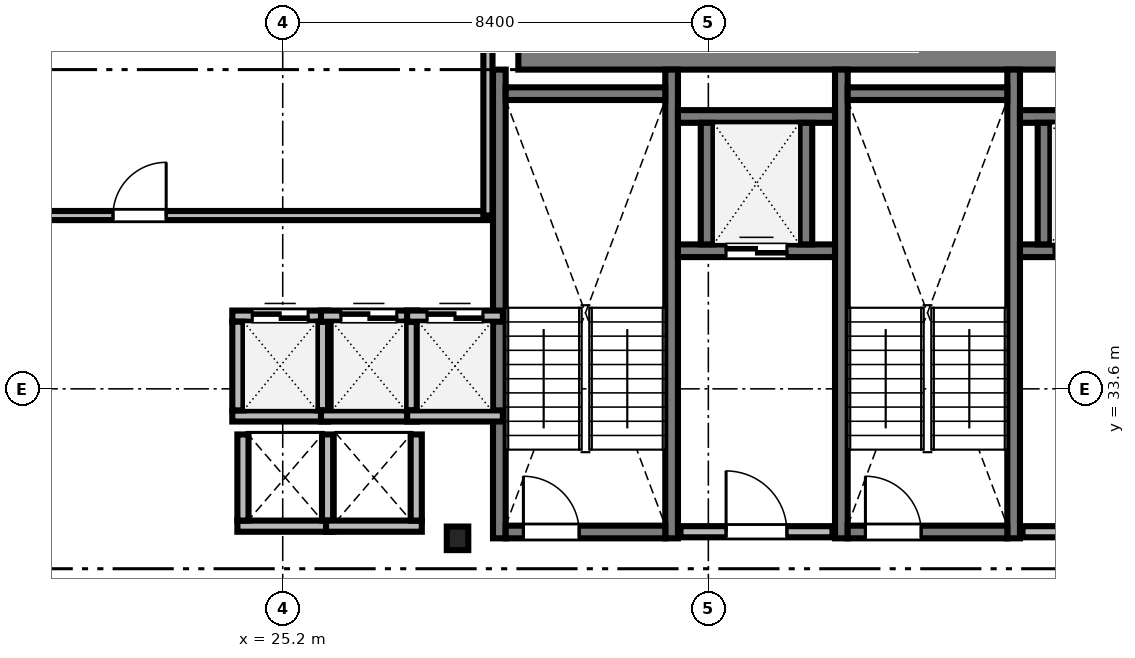
"""IFC4 building model, lengths in metres.
Left out: names, types, materials, properties, quantities, classifications, styles, units other than length and angle.
Written with IfcOpenShell. Run it as: python <this file> out.ifc"""

import sys

from ifc_helpers import new_model, si_unit, direction, frame, frame_2d, origin, origin_2d, place, context, subcontext, project, spatial, rectangle, i_section, extrude, source, transform, mapped, element, fill, save


model = new_model("IFC4")
c1 = context("Model", 3, precision=1e-05, world=origin(), true_north=direction((0.0, 1.0)))
c2 = subcontext(c1, "Body", "Model", "MODEL_VIEW")
j1 = project(units=[si_unit("LENGTHUNIT", "METRE"), si_unit("PLANEANGLEUNIT", "RADIAN")], contexts=[c1])
p1 = place(None, origin())
s1 = spatial("IfcSite", under=j1, at=p1, CompositionType="ELEMENT")
p2 = place(p1, origin())
s2 = spatial("IfcBuilding", under=s1, at=p2, CompositionType="ELEMENT")
p3 = place(p2, frame((0.0, 0.0, 118.7)))
s3 = spatial("IfcBuildingStorey", under=s2, at=p3, CompositionType="ELEMENT", Elevation=118.7)
m1 = source(origin(), c2, "Body", "SweptSolid", [
    extrude(rectangle(XDim=17.52, YDim=0.8, at=frame_2d((8.76, 0.0))), origin(), (0.0, 0.0, 1.0), 3.46),
])
p4 = place(p3, frame((29.85, 40.3, 0.0), z_axis=(0.0, 0.0, 1.0), x_axis=(1.0, 0.0, 0.0)))
e1 = element("IfcWall", 1, at=p4, inside=s3, PredefinedType="SHEAR", context=c2, shape_type="MappedRepresentation", body=[
    mapped(m1, transform((0.0, 0.0, 0.0), scale=1.0)),
])
m2 = source(origin(), c2, "Body", "SweptSolid", [
    extrude(i_section(OverallWidth=0.424, OverallDepth=0.465, WebThickness=0.035, FlangeThickness=0.056, FilletRadius=0.015, at=origin_2d()), origin(), (0.0, 0.0, 1.0), 3.46),
])
p5 = place(p3, frame((28.65, 30.65, 0.0), z_axis=(0.0, 0.0, 1.0), x_axis=(1.0, 0.0, 0.0)))
e2 = element("IfcColumn", 2, at=p5, inside=s3, PredefinedType="COLUMN", context=c2, shape_type="MappedRepresentation", body=[
    mapped(m2, transform((0.0, 0.0, 0.0), scale=1.0)),
])
m3 = source(origin(), c2, "Body", "SweptSolid", [
    extrude(rectangle(XDim=9.25, YDim=0.25, at=frame_2d((4.625, 0.0))), origin(), (0.0, 0.0, 1.0), 3.5),
])
for number, where, z_axis, x_axis in (
    (3, (29.475, 30.65, 0.0), (0.0, 0.0, 1.0), (0.0, 1.0, 0.0)),
    (4, (32.875, 30.65, 0.0), (0.0, 0.0, 1.0), (0.0, 1.0, 0.0)),
):
    element("IfcWall", number, at=place(p3, frame(where, z_axis=z_axis, x_axis=x_axis)), inside=s3, PredefinedType="SOLIDWALL", context=c2, shape_type="MappedRepresentation", body=[
        mapped(m3, transform((0.0, 0.0, 0.0), scale=1.0)),
    ])
m4 = source(origin(), c2, "Body", "SweptSolid", [
    extrude(rectangle(XDim=3.15, YDim=0.25, at=frame_2d((1.575, 0.0))), origin(), (0.0, 0.0, 1.0), 3.5),
])
p6 = place(p3, frame((29.6, 39.425, 0.0), z_axis=(0.0, 0.0, 1.0), x_axis=(1.0, 0.0, 0.0)))
e5 = element("IfcWall", 5, at=p6, inside=s3, PredefinedType="SOLIDWALL", context=c2, shape_type="MappedRepresentation", body=[
    mapped(m4, transform((0.0, 0.0, 0.0), scale=1.0)),
])
p7 = place(p3, frame((29.6, 30.775, 0.0), z_axis=(0.0, 0.0, 1.0), x_axis=(1.0, 0.0, 0.0)))
e6 = element("IfcWall", 6, at=p7, inside=s3, PredefinedType="SOLIDWALL", context=c2, shape_type="MappedRepresentation", body=[
    mapped(m4, transform((0.0, 0.0, 0.0), scale=1.0)),
])
m5 = source(origin(), c2, "Body", "SweptSolid", [
    extrude(rectangle(XDim=1.1, YDim=2.2, at=frame_2d((0.55, 1.1))), frame((0.0, 0.135, 0.0), z_axis=(0.0, -1.0, 0.0), x_axis=(1.0, 0.0, 0.0)), (0.0, 0.0, 1.0), 0.27),
])
p8 = place(p7, frame((0.35, 0.0, 0.0)))
e7 = element("IfcOpeningElement", 7, at=p8, cuts=e6, PredefinedType="OPENING", context=c2, shape_type="MappedRepresentation", body=[
    mapped(m5, transform((0.0, 0.0, 0.0), scale=1.0)),
])
for number, where, z_axis, x_axis in (
    (8, (36.225, 30.65, 0.0), (0.0, 0.0, 1.0), (0.0, 1.0, 0.0)),
    (9, (39.625, 30.65, 0.0), (0.0, 0.0, 1.0), (0.0, 1.0, 0.0)),
):
    element("IfcWall", number, at=place(p3, frame(where, z_axis=z_axis, x_axis=x_axis)), inside=s3, PredefinedType="SOLIDWALL", context=c2, shape_type="MappedRepresentation", body=[
        mapped(m3, transform((0.0, 0.0, 0.0), scale=1.0)),
    ])
p9 = place(p3, frame((36.35, 39.425, 0.0), z_axis=(0.0, 0.0, 1.0), x_axis=(1.0, 0.0, 0.0)))
e10 = element("IfcWall", 10, at=p9, inside=s3, PredefinedType="SOLIDWALL", context=c2, shape_type="MappedRepresentation", body=[
    mapped(m4, transform((0.0, 0.0, 0.0), scale=1.0)),
])
p10 = place(p3, frame((36.35, 30.775, 0.0), z_axis=(0.0, 0.0, 1.0), x_axis=(1.0, 0.0, 0.0)))
e11 = element("IfcWall", 11, at=p10, inside=s3, PredefinedType="SOLIDWALL", context=c2, shape_type="MappedRepresentation", body=[
    mapped(m4, transform((0.0, 0.0, 0.0), scale=1.0)),
])
p11 = place(p10, frame((0.35, 0.0, 0.0)))
e12 = element("IfcOpeningElement", 12, at=p11, cuts=e11, PredefinedType="OPENING", context=c2, shape_type="MappedRepresentation", body=[
    mapped(m5, transform((0.0, 0.0, 0.0), scale=1.0)),
])
m6 = source(origin(), c2, "Body", "SweptSolid", [
    extrude(rectangle(XDim=3.0, YDim=0.22, at=frame_2d((1.5, 0.0))), origin(), (0.0, 0.0, 1.0), 3.46),
])
p12 = place(p3, frame((33.05, 30.78, 0.0), z_axis=(0.0, 0.0, 1.0), x_axis=(1.0, 0.0, 0.0)))
e13 = element("IfcWall", 13, at=p12, inside=s3, PredefinedType="SOLIDWALL", context=c2, shape_type="MappedRepresentation", body=[
    mapped(m6, transform((0.0, 0.0, 0.0), scale=1.0)),
])
m7 = source(origin(), c2, "Body", "SweptSolid", [
    extrude(rectangle(XDim=1.2, YDim=2.2, at=frame_2d((0.6, 1.1))), frame((0.0, 0.12, 0.0), z_axis=(0.0, -1.0, 0.0), x_axis=(1.0, 0.0, 0.0)), (0.0, 0.0, 1.0), 0.24),
])
p13 = place(p12, frame((0.9, 0.0, 0.0)))
e14 = element("IfcOpeningElement", 14, at=p13, cuts=e13, PredefinedType="OPENING", context=c2, shape_type="MappedRepresentation", body=[
    mapped(m7, transform((0.0, 0.0, 0.0), scale=1.0)),
])
m8 = source(origin(), c2, "Body", "SweptSolid", [
    extrude(rectangle(XDim=2.8, YDim=0.22, at=frame_2d((1.4, 0.0))), origin(), (0.0, 0.0, 1.0), 3.46),
])
p14 = place(p3, frame((39.8, 30.78, 0.0), z_axis=(0.0, 0.0, 1.0), x_axis=(1.0, 0.0, 0.0)))
e15 = element("IfcWall", 15, at=p14, inside=s3, PredefinedType="SOLIDWALL", context=c2, shape_type="MappedRepresentation", body=[
    mapped(m8, transform((0.0, 0.0, 0.0), scale=1.0)),
])
p15 = place(p14, frame((0.8, 0.0, 0.0)))
e16 = element("IfcOpeningElement", 16, at=p15, cuts=e15, PredefinedType="OPENING", context=c2, shape_type="MappedRepresentation", body=[
    mapped(m7, transform((0.0, 0.0, 0.0), scale=1.0)),
])
m9 = source(origin(), c2, "Body", "SweptSolid", [
    extrude(rectangle(XDim=1.89, YDim=0.22, at=frame_2d((0.945, 0.0))), origin(), (0.0, 0.0, 1.0), 3.46),
])
p16 = place(p3, frame((24.205, 33.065, 0.0), z_axis=(0.0, 0.0, 1.0), x_axis=(1.0, 0.0, 0.0)))
e17 = element("IfcWall", 17, at=p16, inside=s3, PredefinedType="SOLIDWALL", context=c2, shape_type="MappedRepresentation", body=[
    mapped(m9, transform((0.0, 0.0, 0.0), scale=1.0)),
])
p17 = place(p3, frame((24.205, 35.035, 0.0), z_axis=(0.0, 0.0, 1.0), x_axis=(1.0, 0.0, 0.0)))
e18 = element("IfcWall", 18, at=p17, inside=s3, PredefinedType="SOLIDWALL", context=c2, shape_type="MappedRepresentation", body=[
    mapped(m9, transform((0.0, 0.0, 0.0), scale=1.0)),
])
m10 = source(origin(), c2, "Body", "SweptSolid", [
    extrude(rectangle(XDim=1.1, YDim=2.2, at=frame_2d((0.55, 1.1))), frame((0.0, 0.12, 0.0), z_axis=(0.0, -1.0, 0.0), x_axis=(1.0, 0.0, 0.0)), (0.0, 0.0, 1.0), 0.24),
])
p18 = place(p17, frame((0.395, 0.0, 0.0)))
e19 = element("IfcOpeningElement", 19, at=p18, cuts=e18, PredefinedType="OPENING", context=c2, shape_type="MappedRepresentation", body=[
    mapped(m10, transform((0.0, 0.0, 0.0), scale=1.0)),
])
m11 = source(origin(), c2, "Body", "SweptSolid", [
    extrude(rectangle(XDim=1.75, YDim=0.22, at=frame_2d((0.875, 0.0))), origin(), (0.0, 0.0, 1.0), 3.46),
])
for number, where, z_axis, x_axis in (
    (20, (24.315, 33.175, 0.0), (0.0, 0.0, 1.0), (0.0, 1.0, 0.0)),
    (21, (25.985, 33.175, 0.0), (0.0, 0.0, 1.0), (0.0, 1.0, 0.0)),
):
    element("IfcWall", number, at=place(p3, frame(where, z_axis=z_axis, x_axis=x_axis)), inside=s3, PredefinedType="SOLIDWALL", context=c2, shape_type="MappedRepresentation", body=[
        mapped(m11, transform((0.0, 0.0, 0.0), scale=1.0)),
    ])
p19 = place(p3, frame((25.955, 33.065, 0.0), z_axis=(0.0, 0.0, 1.0), x_axis=(1.0, 0.0, 0.0)))
e22 = element("IfcWall", 22, at=p19, inside=s3, PredefinedType="SOLIDWALL", context=c2, shape_type="MappedRepresentation", body=[
    mapped(m9, transform((0.0, 0.0, 0.0), scale=1.0)),
])
p20 = place(p3, frame((25.955, 35.035, 0.0), z_axis=(0.0, 0.0, 1.0), x_axis=(1.0, 0.0, 0.0)))
e23 = element("IfcWall", 23, at=p20, inside=s3, PredefinedType="SOLIDWALL", context=c2, shape_type="MappedRepresentation", body=[
    mapped(m9, transform((0.0, 0.0, 0.0), scale=1.0)),
])
p21 = place(p20, frame((0.395, 0.0, 0.0)))
e24 = element("IfcOpeningElement", 24, at=p21, cuts=e23, PredefinedType="OPENING", context=c2, shape_type="MappedRepresentation", body=[
    mapped(m10, transform((0.0, 0.0, 0.0), scale=1.0)),
])
p22 = place(p3, frame((27.735, 33.175, 0.0), z_axis=(0.0, 0.0, 1.0), x_axis=(0.0, 1.0, 0.0)))
e25 = element("IfcWall", 25, at=p22, inside=s3, PredefinedType="SOLIDWALL", context=c2, shape_type="MappedRepresentation", body=[
    mapped(m11, transform((0.0, 0.0, 0.0), scale=1.0)),
])
p23 = place(p3, frame((27.655, 33.065, 0.0), z_axis=(0.0, 0.0, 1.0), x_axis=(1.0, 0.0, 0.0)))
e26 = element("IfcWall", 26, at=p23, inside=s3, PredefinedType="SOLIDWALL", context=c2, shape_type="MappedRepresentation", body=[
    mapped(m9, transform((0.0, 0.0, 0.0), scale=1.0)),
])
p24 = place(p3, frame((27.655, 35.035, 0.0), z_axis=(0.0, 0.0, 1.0), x_axis=(1.0, 0.0, 0.0)))
e27 = element("IfcWall", 27, at=p24, inside=s3, PredefinedType="SOLIDWALL", context=c2, shape_type="MappedRepresentation", body=[
    mapped(m9, transform((0.0, 0.0, 0.0), scale=1.0)),
])
p25 = place(p24, frame((0.395, 0.0, 0.0)))
e28 = element("IfcOpeningElement", 28, at=p25, cuts=e27, PredefinedType="OPENING", context=c2, shape_type="MappedRepresentation", body=[
    mapped(m10, transform((0.0, 0.0, 0.0), scale=1.0)),
])
m12 = source(origin(), c2, "Body", "SweptSolid", [
    extrude(rectangle(XDim=3.1, YDim=0.25, at=frame_2d((1.55, 0.0))), origin(), (0.0, 0.0, 1.0), 3.46),
])
p26 = place(p3, frame((33.0, 36.325, 0.0), z_axis=(0.0, 0.0, 1.0), x_axis=(1.0, 0.0, 0.0)))
e29 = element("IfcWall", 29, at=p26, inside=s3, PredefinedType="SOLIDWALL", context=c2, shape_type="MappedRepresentation", body=[
    mapped(m12, transform((0.0, 0.0, 0.0), scale=1.0)),
])
m13 = source(origin(), c2, "Body", "SweptSolid", [
    extrude(rectangle(XDim=1.2, YDim=2.25, at=frame_2d((0.6, 1.125))), frame((0.0, 0.135, 0.0), z_axis=(0.0, -1.0, 0.0), x_axis=(1.0, 0.0, 0.0)), (0.0, 0.0, 1.0), 0.27),
])
p27 = place(p26, frame((0.95, 0.0, 0.0)))
e30 = element("IfcOpeningElement", 30, at=p27, cuts=e29, PredefinedType="OPENING", context=c2, shape_type="MappedRepresentation", body=[
    mapped(m13, transform((0.0, 0.0, 0.0), scale=1.0)),
])
p28 = place(p3, frame((33.0, 38.975, 0.0), z_axis=(0.0, 0.0, 1.0), x_axis=(1.0, 0.0, 0.0)))
e31 = element("IfcWall", 31, at=p28, inside=s3, PredefinedType="SOLIDWALL", context=c2, shape_type="MappedRepresentation", body=[
    mapped(m12, transform((0.0, 0.0, 0.0), scale=1.0)),
])
m14 = source(origin(), c2, "Body", "SweptSolid", [
    extrude(rectangle(XDim=2.4, YDim=0.25, at=frame_2d((1.2, 0.0))), origin(), (0.0, 0.0, 1.0), 3.46),
])
for number, where, z_axis, x_axis in (
    (32, (33.575, 36.45, 0.0), (0.0, 0.0, 1.0), (0.0, 1.0, 0.0)),
    (33, (35.525, 36.45, 0.0), (0.0, 0.0, 1.0), (0.0, 1.0, 0.0)),
):
    element("IfcWall", number, at=place(p3, frame(where, z_axis=z_axis, x_axis=x_axis)), inside=s3, PredefinedType="SOLIDWALL", context=c2, shape_type="MappedRepresentation", body=[
        mapped(m14, transform((0.0, 0.0, 0.0), scale=1.0)),
    ])
m15 = source(origin(), c2, "Body", "SweptSolid", [
    extrude(rectangle(XDim=2.55, YDim=0.25, at=frame_2d((1.275, 0.0))), origin(), (0.0, 0.0, 1.0), 3.46),
])
p29 = place(p3, frame((39.75, 36.325, 0.0), z_axis=(0.0, 0.0, 1.0), x_axis=(1.0, 0.0, 0.0)))
e34 = element("IfcWall", 34, at=p29, inside=s3, PredefinedType="SOLIDWALL", context=c2, shape_type="MappedRepresentation", body=[
    mapped(m15, transform((0.0, 0.0, 0.0), scale=1.0)),
])
p30 = place(p29, frame((0.675, 0.0, 0.0)))
e35 = element("IfcOpeningElement", 35, at=p30, cuts=e34, PredefinedType="OPENING", context=c2, shape_type="MappedRepresentation", body=[
    mapped(m13, transform((0.0, 0.0, 0.0), scale=1.0)),
])
p31 = place(p3, frame((39.75, 38.975, 0.0), z_axis=(0.0, 0.0, 1.0), x_axis=(1.0, 0.0, 0.0)))
e36 = element("IfcWall", 36, at=p31, inside=s3, PredefinedType="SOLIDWALL", context=c2, shape_type="MappedRepresentation", body=[
    mapped(m15, transform((0.0, 0.0, 0.0), scale=1.0)),
])
p32 = place(p3, frame((40.225, 36.45, 0.0), z_axis=(0.0, 0.0, 1.0), x_axis=(0.0, 1.0, 0.0)))
e37 = element("IfcWall", 37, at=p32, inside=s3, PredefinedType="SOLIDWALL", context=c2, shape_type="MappedRepresentation", body=[
    mapped(m14, transform((0.0, 0.0, 0.0), scale=1.0)),
])
m16 = source(origin(), c2, "Body", "SweptSolid", [
    extrude(rectangle(XDim=1.89, YDim=0.22, at=frame_2d((0.945, 0.0))), origin(), (0.0, 0.0, 1.0), 3.46),
])
p33 = place(p3, frame((24.305, 30.89, 0.0), z_axis=(0.0, 0.0, 1.0), x_axis=(1.0, 0.0, 0.0)))
e38 = element("IfcWall", 38, at=p33, inside=s3, PredefinedType="SOLIDWALL", context=c2, shape_type="MappedRepresentation", body=[
    mapped(m16, transform((0.0, 0.0, 0.0), scale=1.0)),
])
m17 = source(origin(), c2, "Body", "SweptSolid", [
    extrude(rectangle(XDim=1.7, YDim=0.22, at=frame_2d((0.85, 0.0))), origin(), (0.0, 0.0, 1.0), 3.46),
])
for number, where, z_axis, x_axis in (
    (39, (24.415, 31.0, 0.0), (0.0, 0.0, 1.0), (0.0, 1.0, 0.0)),
    (40, (26.085, 31.0, 0.0), (0.0, 0.0, 1.0), (0.0, 1.0, 0.0)),
):
    element("IfcWall", number, at=place(p3, frame(where, z_axis=z_axis, x_axis=x_axis)), inside=s3, PredefinedType="SOLIDWALL", context=c2, shape_type="MappedRepresentation", body=[
        mapped(m17, transform((0.0, 0.0, 0.0), scale=1.0)),
    ])
p34 = place(p3, frame((26.055, 30.89, 0.0), z_axis=(0.0, 0.0, 1.0), x_axis=(1.0, 0.0, 0.0)))
e41 = element("IfcWall", 41, at=p34, inside=s3, PredefinedType="SOLIDWALL", context=c2, shape_type="MappedRepresentation", body=[
    mapped(m16, transform((0.0, 0.0, 0.0), scale=1.0)),
])
p35 = place(p3, frame((27.835, 31.0, 0.0), z_axis=(0.0, 0.0, 1.0), x_axis=(0.0, 1.0, 0.0)))
e42 = element("IfcWall", 42, at=p35, inside=s3, PredefinedType="SOLIDWALL", context=c2, shape_type="MappedRepresentation", body=[
    mapped(m17, transform((0.0, 0.0, 0.0), scale=1.0)),
])
m18 = source(origin(), c2, "Body", "SweptSolid", [
    extrude(rectangle(XDim=22.328, YDim=0.18, at=frame_2d((11.164, 0.0))), origin(), (0.0, 0.0, 1.0), 2.702),
])
p36 = place(p3, frame((6.922, 37.02, 0.0), z_axis=(0.0, 0.0, 1.0), x_axis=(1.0, 0.0, 0.0)))
e43 = element("IfcWall", 43, at=p36, inside=s3, PredefinedType="PARTITIONING", context=c2, shape_type="MappedRepresentation", body=[
    mapped(m18, transform((0.0, 0.0, 0.0), scale=1.0)),
])
m19 = source(origin(), c2, "Body", "SweptSolid", [
    extrude(rectangle(XDim=1.05, YDim=2.2, at=frame_2d((0.525, 1.1))), frame((0.0, 0.1, 0.0), z_axis=(0.0, -1.0, 0.0), x_axis=(1.0, 0.0, 0.0)), (0.0, 0.0, 1.0), 0.2),
])
p37 = place(p36, frame((14.928, 0.0, 0.0)))
e44 = element("IfcOpeningElement", 44, at=p37, cuts=e43, PredefinedType="OPENING", context=c2, shape_type="MappedRepresentation", body=[
    mapped(m19, transform((0.0, 0.0, 0.0), scale=1.0)),
])
m20 = source(origin(), c2, "Body", "SweptSolid", [
    extrude(rectangle(XDim=11.45, YDim=0.18, at=frame_2d((5.725, 0.0))), origin(), (0.0, 0.0, 1.0), 2.702),
])
p38 = place(p3, frame((29.25, 37.02, 0.0), z_axis=(0.0, 0.0, 1.0), x_axis=(0.0, 1.0, 0.0)))
e45 = element("IfcWall", 45, at=p38, inside=s3, PredefinedType="PARTITIONING", context=c2, shape_type="MappedRepresentation", body=[
    mapped(m20, transform((0.0, 0.0, 0.0), scale=1.0)),
])
m21 = source(origin(), c2, "Body", "SweptSolid", [
    extrude(rectangle(XDim=1.1, YDim=2.2, at=frame_2d((0.55, 1.1))), frame((0.0, 0.025, 0.0), z_axis=(0.0, -1.0, 0.0), x_axis=(1.0, 0.0, 0.0)), (0.0, 0.0, 1.0), 0.05),
])
p39 = place(p8, origin())
e46 = element("IfcDoor", 46, at=p39, inside=s3, OperationType="SINGLE_SWING_LEFT", PredefinedType="DOOR", context=c2, shape_type="MappedRepresentation", body=[
    mapped(m21, transform((0.0, 0.0, 0.0), scale=1.0)),
])
fill(e7, e46)
p40 = place(p11, origin())
e47 = element("IfcDoor", 47, at=p40, inside=s3, OperationType="SINGLE_SWING_LEFT", PredefinedType="DOOR", context=c2, shape_type="MappedRepresentation", body=[
    mapped(m21, transform((0.0, 0.0, 0.0), scale=1.0)),
])
fill(e12, e47)
m22 = source(origin(), c2, "Body", "SweptSolid", [
    extrude(rectangle(XDim=1.2, YDim=2.2, at=frame_2d((0.6, 1.1))), frame((0.0, 0.025, 0.0), z_axis=(0.0, -1.0, 0.0), x_axis=(1.0, 0.0, 0.0)), (0.0, 0.0, 1.0), 0.05),
])
p41 = place(p13, origin())
e48 = element("IfcDoor", 48, at=p41, inside=s3, OperationType="SINGLE_SWING_LEFT", PredefinedType="DOOR", context=c2, shape_type="MappedRepresentation", body=[
    mapped(m22, transform((0.0, 0.0, 0.0), scale=1.0)),
])
fill(e14, e48)
p42 = place(p18, origin())
e49 = element("IfcDoor", 49, at=p42, inside=s3, OperationType="DOUBLE_DOOR_SLIDING", PredefinedType="DOOR", context=c2, shape_type="MappedRepresentation", body=[
    mapped(m21, transform((0.0, 0.0, 0.0), scale=1.0)),
])
fill(e19, e49)
p43 = place(p21, origin())
e50 = element("IfcDoor", 50, at=p43, inside=s3, OperationType="DOUBLE_DOOR_SLIDING", PredefinedType="DOOR", context=c2, shape_type="MappedRepresentation", body=[
    mapped(m21, transform((0.0, 0.0, 0.0), scale=1.0)),
])
fill(e24, e50)
p44 = place(p25, origin())
e51 = element("IfcDoor", 51, at=p44, inside=s3, OperationType="DOUBLE_DOOR_SLIDING", PredefinedType="DOOR", context=c2, shape_type="MappedRepresentation", body=[
    mapped(m21, transform((0.0, 0.0, 0.0), scale=1.0)),
])
fill(e28, e51)
m23 = source(origin(), c2, "Body", "SweptSolid", [
    extrude(rectangle(XDim=1.2, YDim=2.25, at=frame_2d((0.6, 1.125))), frame((0.0, 0.025, 0.0), z_axis=(0.0, -1.0, 0.0), x_axis=(1.0, 0.0, 0.0)), (0.0, 0.0, 1.0), 0.05),
])
p45 = place(p27, origin())
e52 = element("IfcDoor", 52, at=p45, inside=s3, OperationType="DOUBLE_DOOR_SLIDING", PredefinedType="DOOR", context=c2, shape_type="MappedRepresentation", body=[
    mapped(m23, transform((0.0, 0.0, 0.0), scale=1.0)),
])
fill(e30, e52)
p46 = place(p30, origin())
e53 = element("IfcDoor", 53, at=p46, inside=s3, OperationType="DOUBLE_DOOR_SLIDING", PredefinedType="DOOR", context=c2, shape_type="MappedRepresentation", body=[
    mapped(m23, transform((0.0, 0.0, 0.0), scale=1.0)),
])
fill(e35, e53)
m24 = source(origin(), c2, "Body", "SweptSolid", [
    extrude(rectangle(XDim=1.05, YDim=2.2, at=frame_2d((0.525, 1.1))), frame((0.0, 0.025, 0.0), z_axis=(0.0, -1.0, 0.0), x_axis=(1.0, 0.0, 0.0)), (0.0, 0.0, 1.0), 0.05),
])
p47 = place(p37, origin())
e54 = element("IfcDoor", 54, at=p47, inside=s3, OperationType="SINGLE_SWING_RIGHT", PredefinedType="DOOR", context=c2, shape_type="MappedRepresentation", body=[
    mapped(m24, transform((0.0, 0.0, 0.0), scale=1.0)),
])
fill(e44, e54)
save(model, sys.argv[1])
